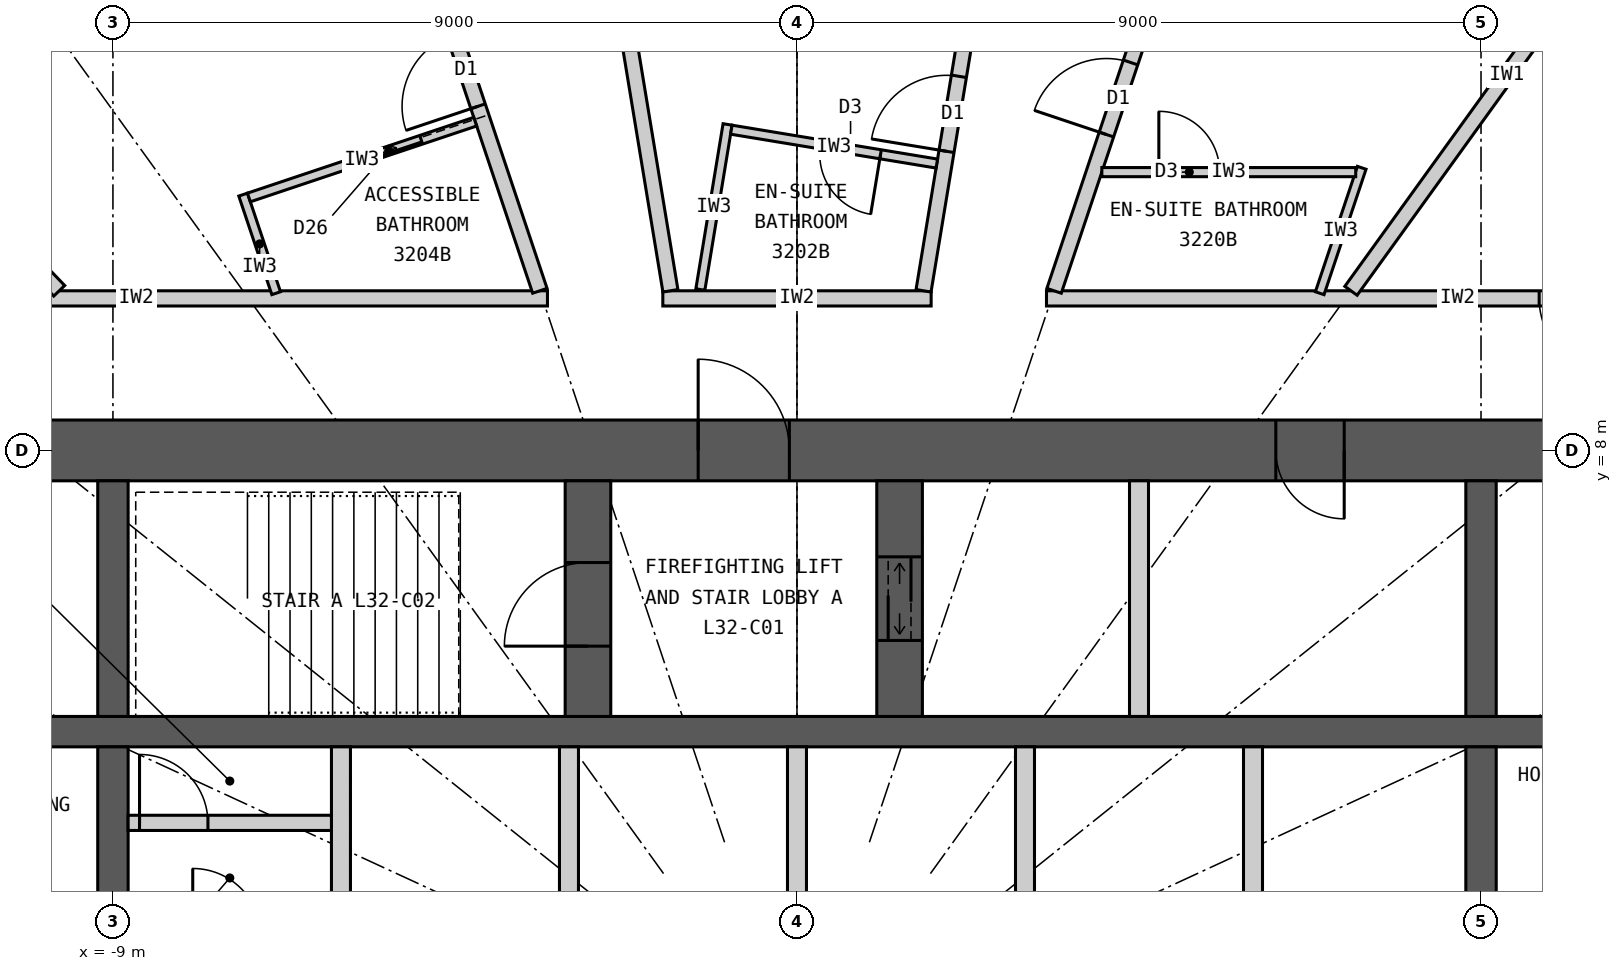
"""IFC4 building model, lengths in metres.
Left out: names, types, materials, properties, quantities, classifications, styles, units other than length and angle.
Written with IfcOpenShell. Run it as: python <this file> out.ifc"""

import sys

from ifc_helpers import new_model, si_unit, direction, frame, frame_2d, origin, place, context, subcontext, project, spatial, rectangle, extrude, element, fill, save


model = new_model("IFC4")
c1 = context("Model", 3, precision=1e-05, world=origin(), true_north=direction((0.0, 1.0)))
c2 = subcontext(c1, "Body", "Model", "MODEL_VIEW")
j1 = project(units=[si_unit("LENGTHUNIT", "METRE"), si_unit("PLANEANGLEUNIT", "RADIAN")], contexts=[c1])
p1 = place(None, origin())
s1 = spatial("IfcSite", under=j1, at=p1, CompositionType="ELEMENT")
p2 = place(p1, origin())
s2 = spatial("IfcBuilding", under=s1, at=p2, CompositionType="ELEMENT")
p3 = place(p2, frame((0.0, 0.0, 125.4)))
s3 = spatial("IfcBuildingStorey", under=s2, at=p3, CompositionType="ELEMENT", Elevation=125.4)
p4 = place(p3, frame((-12.4, 8.0, 0.0), z_axis=(0.0, 0.0, 1.0), x_axis=(1.0, 0.0, 0.0)))
e1 = element("IfcWall", 1, at=p4, inside=s3, PredefinedType="SHEAR", context=c2, shape_type="SweptSolid", body=[
    extrude(rectangle(XDim=24.8, YDim=0.8, at=frame_2d((12.4, 0.0))), origin(), (0.0, 0.0, 1.0), 3.3),
])
p5 = place(p4, frame((11.1, 0.0, 0.0)))
e2 = element("IfcOpeningElement", 2, at=p5, cuts=e1, PredefinedType="OPENING", context=c2, shape_type="SweptSolid", body=[
    extrude(rectangle(XDim=1.2, YDim=2.2, at=frame_2d((0.6, 1.1))), frame((0.0, 0.41, 0.0), z_axis=(0.0, -1.0, 0.0), x_axis=(1.0, 0.0, 0.0)), (0.0, 0.0, 1.0), 0.82),
])
p6 = place(p4, frame((18.7, 0.0, 0.0)))
e3 = element("IfcOpeningElement", 3, at=p6, cuts=e1, PredefinedType="OPENING", context=c2, shape_type="SweptSolid", body=[
    extrude(rectangle(XDim=0.9, YDim=2.2, at=frame_2d((0.45, 1.1))), frame((0.0, 0.41, 0.0), z_axis=(0.0, -1.0, 0.0), x_axis=(1.0, 0.0, 0.0)), (0.0, 0.0, 1.0), 0.82),
])
p7 = place(p3, frame((-11.6, 4.3, 0.0), z_axis=(0.0, 0.0, 1.0), x_axis=(1.0, 0.0, 0.0)))
e4 = element("IfcWall", 4, at=p7, inside=s3, PredefinedType="SHEAR", context=c2, shape_type="SweptSolid", body=[
    extrude(rectangle(XDim=23.2, YDim=0.4, at=frame_2d((11.6, 0.0))), origin(), (0.0, 0.0, 1.0), 3.3),
])
p8 = place(p3, frame((-9.0, 4.5, 0.0), z_axis=(0.0, 0.0, 1.0), x_axis=(0.0, 1.0, 0.0)))
e5 = element("IfcWall", 5, at=p8, inside=s3, PredefinedType="SHEAR", context=c2, shape_type="SweptSolid", body=[
    extrude(rectangle(XDim=3.1, YDim=0.4, at=frame_2d((1.55, 0.0))), origin(), (0.0, 0.0, 1.0), 3.3),
])
p9 = place(p3, frame((-9.0, 1.75, 0.0), z_axis=(0.0, 0.0, 1.0), x_axis=(0.0, 1.0, 0.0)))
e6 = element("IfcWall", 6, at=p9, inside=s3, PredefinedType="SHEAR", context=c2, shape_type="SweptSolid", body=[
    extrude(rectangle(XDim=2.35, YDim=0.4, at=frame_2d((1.175, 0.0))), origin(), (0.0, 0.0, 1.0), 3.3),
])
p10 = place(p3, frame((9.0, 4.5, 0.0), z_axis=(0.0, 0.0, 1.0), x_axis=(0.0, 1.0, 0.0)))
e7 = element("IfcWall", 7, at=p10, inside=s3, PredefinedType="SHEAR", context=c2, shape_type="SweptSolid", body=[
    extrude(rectangle(XDim=3.1, YDim=0.4, at=frame_2d((1.55, 0.0))), origin(), (0.0, 0.0, 1.0), 3.3),
])
p11 = place(p3, frame((9.0, 1.75, 0.0), z_axis=(0.0, 0.0, 1.0), x_axis=(0.0, 1.0, 0.0)))
e8 = element("IfcWall", 8, at=p11, inside=s3, PredefinedType="SHEAR", context=c2, shape_type="SweptSolid", body=[
    extrude(rectangle(XDim=2.35, YDim=0.4, at=frame_2d((1.175, 0.0))), origin(), (0.0, 0.0, 1.0), 3.3),
])
p12 = place(p3, frame((-2.75, 4.5, 0.0), z_axis=(0.0, 0.0, 1.0), x_axis=(0.0, 1.0, 0.0)))
e9 = element("IfcWall", 9, at=p12, inside=s3, PredefinedType="SHEAR", context=c2, shape_type="SweptSolid", body=[
    extrude(rectangle(XDim=3.1, YDim=0.6, at=frame_2d((1.55, 0.0))), origin(), (0.0, 0.0, 1.0), 3.3),
])
p13 = place(p12, frame((0.925, 0.0, 0.0)))
e10 = element("IfcOpeningElement", 10, at=p13, cuts=e9, PredefinedType="OPENING", context=c2, shape_type="SweptSolid", body=[
    extrude(rectangle(XDim=1.1, YDim=2.2, at=frame_2d((0.55, 1.1))), frame((0.0, 0.31, 0.0), z_axis=(0.0, -1.0, 0.0), x_axis=(1.0, 0.0, 0.0)), (0.0, 0.0, 1.0), 0.62),
])
p14 = place(p3, frame((1.35, 4.5, 0.0), z_axis=(0.0, 0.0, 1.0), x_axis=(0.0, 1.0, 0.0)))
e11 = element("IfcWall", 11, at=p14, inside=s3, PredefinedType="SHEAR", context=c2, shape_type="SweptSolid", body=[
    extrude(rectangle(XDim=3.1, YDim=0.6, at=frame_2d((1.55, 0.0))), origin(), (0.0, 0.0, 1.0), 3.3),
])
p15 = place(p14, frame((1.0, 0.0, 0.0)))
e12 = element("IfcOpeningElement", 12, at=p15, cuts=e11, PredefinedType="OPENING", context=c2, shape_type="SweptSolid", body=[
    extrude(rectangle(XDim=1.1, YDim=2.2, at=frame_2d((0.55, 1.1))), frame((0.0, 0.31, 0.0), z_axis=(0.0, -1.0, 0.0), x_axis=(1.0, 0.0, 0.0)), (0.0, 0.0, 1.0), 0.62),
])
p16 = place(p3, frame((4.5, 4.5, 0.0), z_axis=(0.0, 0.0, 1.0), x_axis=(0.0, 1.0, 0.0)))
e13 = element("IfcWall", 13, at=p16, inside=s3, PredefinedType="PARTITIONING", context=c2, shape_type="SweptSolid", body=[
    extrude(rectangle(XDim=3.1, YDim=0.25, at=frame_2d((1.55, 0.0))), origin(), (0.0, 0.0, 1.0), 3.3),
])
for number, where, z_axis, x_axis in (
    (14, (-6.0, 1.75, 0.0), (0.0, 0.0, 1.0), (0.0, 1.0, 0.0)),
    (15, (-3.0, 1.75, 0.0), (0.0, 0.0, 1.0), (0.0, 1.0, 0.0)),
    (16, (0.0, 1.75, 0.0), (0.0, 0.0, 1.0), (0.0, 1.0, 0.0)),
    (17, (3.0, 1.75, 0.0), (0.0, 0.0, 1.0), (0.0, 1.0, 0.0)),
    (18, (6.0, 1.75, 0.0), (0.0, 0.0, 1.0), (0.0, 1.0, 0.0)),
):
    element("IfcWall", number, at=place(p3, frame(where, z_axis=z_axis, x_axis=x_axis)), inside=s3, PredefinedType="PARTITIONING", context=c2, shape_type="SweptSolid", body=[
        extrude(rectangle(XDim=2.35, YDim=0.25, at=frame_2d((1.175, 0.0))), origin(), (0.0, 0.0, 1.0), 3.3),
    ])
p17 = place(p3, frame((-14.1, 10.0, 0.0), z_axis=(0.0, 0.0, 1.0), x_axis=(1.0, 0.0, 0.0)))
e19 = element("IfcWall", 19, at=p17, inside=s3, PredefinedType="PARTITIONING", context=c2, shape_type="SweptSolid", body=[
    extrude(rectangle(XDim=10.817, YDim=0.2, at=frame_2d((5.409, 0.0))), origin(), (0.0, 0.0, 1.0), 3.12),
])
p18 = place(p3, frame((-1.765, 10.0, 0.0), z_axis=(0.0, 0.0, 1.0), x_axis=(1.0, 0.0, 0.0)))
e20 = element("IfcWall", 20, at=p18, inside=s3, PredefinedType="PARTITIONING", context=c2, shape_type="SweptSolid", body=[
    extrude(rectangle(XDim=3.53, YDim=0.2, at=frame_2d((1.765, 0.0))), origin(), (0.0, 0.0, 1.0), 3.12),
])
p19 = place(p3, frame((3.283, 10.0, 0.0), z_axis=(0.0, 0.0, 1.0), x_axis=(1.0, 0.0, 0.0)))
e21 = element("IfcWall", 21, at=p19, inside=s3, PredefinedType="PARTITIONING", context=c2, shape_type="SweptSolid", body=[
    extrude(rectangle(XDim=10.817, YDim=0.2, at=frame_2d((5.409, 0.0))), origin(), (0.0, 0.0, 1.0), 3.12),
])
p20 = place(p19, frame((6.482, 0.0, 0.0)))
e22 = element("IfcOpeningElement", 22, at=p20, cuts=e21, PredefinedType="OPENING", context=c2, shape_type="SweptSolid", body=[
    extrude(rectangle(XDim=1.0, YDim=2.2, at=frame_2d((0.5, 1.1))), frame((0.0, 0.11, 0.0), z_axis=(0.0, -1.0, 0.0), x_axis=(1.0, 0.0, 0.0)), (0.0, 0.0, 1.0), 0.22),
])
p21 = place(p3, frame((7.289, 10.1, 0.0), z_axis=(0.0, 0.0, 1.0), x_axis=(0.585217367024, 0.81087645997, 0.0)))
e23 = element("IfcWall", 23, at=p21, inside=s3, PredefinedType="PARTITIONING", context=c2, shape_type="SweptSolid", body=[
    extrude(rectangle(XDim=7.016, YDim=0.2, at=frame_2d((3.508, 0.0))), origin(), (0.0, 0.0, 1.0), 2.37),
])
p22 = place(p3, frame((3.383, 10.1, 0.0), z_axis=(0.0, 0.0, 1.0), x_axis=(0.317603705574, 0.948223542318, 0.0)))
e24 = element("IfcWall", 24, at=p22, inside=s3, PredefinedType="PARTITIONING", context=c2, shape_type="SweptSolid", body=[
    extrude(rectangle(XDim=7.823, YDim=0.2, at=frame_2d((3.912, 0.0))), origin(), (0.0, 0.0, 1.0), 2.37),
])
p23 = place(p22, frame((2.168, 0.0, 0.0)))
e25 = element("IfcOpeningElement", 25, at=p23, cuts=e24, PredefinedType="OPENING", context=c2, shape_type="SweptSolid", body=[
    extrude(rectangle(XDim=1.0, YDim=2.2, at=frame_2d((0.5, 1.1))), frame((0.0, 0.11, 0.0), z_axis=(0.0, -1.0, 0.0), x_axis=(1.0, 0.0, 0.0)), (0.0, 0.0, 1.0), 0.22),
])
p24 = place(p3, frame((1.665, 10.1, 0.0), z_axis=(0.0, 0.0, 1.0), x_axis=(0.162660519103, 0.986682094459, 0.0)))
e26 = element("IfcWall", 26, at=p24, inside=s3, PredefinedType="PARTITIONING", context=c2, shape_type="SweptSolid", body=[
    extrude(rectangle(XDim=9.111, YDim=0.2, at=frame_2d((4.555, 0.0))), origin(), (0.0, 0.0, 1.0), 3.12),
])
p25 = place(p24, frame((1.86, 0.0, 0.0)))
e27 = element("IfcOpeningElement", 27, at=p25, cuts=e26, PredefinedType="OPENING", context=c2, shape_type="SweptSolid", body=[
    extrude(rectangle(XDim=1.0, YDim=2.2, at=frame_2d((0.5, 1.1))), frame((0.0, 0.11, 0.0), z_axis=(0.0, -1.0, 0.0), x_axis=(1.0, 0.0, 0.0)), (0.0, 0.0, 1.0), 0.22),
])
p26 = place(p3, frame((-1.665, 10.1, 0.0), z_axis=(0.0, 0.0, 1.0), x_axis=(-0.162660519103, 0.986682094459, 0.0)))
e28 = element("IfcWall", 28, at=p26, inside=s3, PredefinedType="PARTITIONING", context=c2, shape_type="SweptSolid", body=[
    extrude(rectangle(XDim=9.111, YDim=0.2, at=frame_2d((4.555, 0.0))), origin(), (0.0, 0.0, 1.0), 3.12),
])
p27 = place(p3, frame((-3.383, 10.1, 0.0), z_axis=(0.0, 0.0, 1.0), x_axis=(-0.317603705574, 0.948223542318, 0.0)))
e29 = element("IfcWall", 29, at=p27, inside=s3, PredefinedType="PARTITIONING", context=c2, shape_type="SweptSolid", body=[
    extrude(rectangle(XDim=7.823, YDim=0.2, at=frame_2d((3.912, 0.0))), origin(), (0.0, 0.0, 1.0), 2.37),
])
p28 = place(p27, frame((2.56, 0.0, 0.0)))
e30 = element("IfcOpeningElement", 30, at=p28, cuts=e29, PredefinedType="OPENING", context=c2, shape_type="SweptSolid", body=[
    extrude(rectangle(XDim=1.0, YDim=2.2, at=frame_2d((0.5, 1.1))), frame((0.0, 0.11, 0.0), z_axis=(0.0, -1.0, 0.0), x_axis=(1.0, 0.0, 0.0)), (0.0, 0.0, 1.0), 0.22),
])
p29 = place(p3, frame((-9.706, 10.1, 0.0), z_axis=(0.0, 0.0, 1.0), x_axis=(-0.692944801824, 0.720990639069, 0.0)))
e31 = element("IfcWall", 31, at=p29, inside=s3, PredefinedType="PARTITIONING", context=c2, shape_type="SweptSolid", body=[
    extrude(rectangle(XDim=7.234, YDim=0.2, at=frame_2d((3.617, 0.0))), origin(), (0.0, 0.0, 1.0), 3.12),
])
p30 = place(p3, frame((-1.271, 10.116, 0.0), z_axis=(0.0, 0.0, 1.0), x_axis=(0.162672481395, 0.986680122328, 0.0)))
e32 = element("IfcWall", 32, at=p30, inside=s3, PredefinedType="PARTITIONING", context=c2, shape_type="SweptSolid", body=[
    extrude(rectangle(XDim=2.202, YDim=0.12, at=frame_2d((1.101, 0.0))), origin(), (0.0, 0.0, 1.0), 3.12),
])
p31 = place(p3, frame((1.84, 11.774, 0.0), z_axis=(0.0, 0.0, 1.0), x_axis=(-0.986676602341, 0.162693830222, 0.0)))
e33 = element("IfcWall", 33, at=p31, inside=s3, PredefinedType="PARTITIONING", context=c2, shape_type="SweptSolid", body=[
    extrude(rectangle(XDim=2.74, YDim=0.12, at=frame_2d((1.37, 0.0))), origin(), (0.0, 0.0, 1.0), 3.12),
])
p32 = place(p31, frame((0.75, 0.0, 0.0)))
e34 = element("IfcOpeningElement", 34, at=p32, cuts=e33, PredefinedType="OPENING", context=c2, shape_type="SweptSolid", body=[
    extrude(rectangle(XDim=0.8, YDim=2.1, at=frame_2d((0.4, 1.05))), frame((0.0, 0.07, 0.0), z_axis=(0.0, -1.0, 0.0), x_axis=(1.0, 0.0, 0.0)), (0.0, 0.0, 1.0), 0.14),
])
p33 = place(p3, frame((-6.852, 10.068, 0.0), z_axis=(0.0, 0.0, 1.0), x_axis=(-0.317619240343, 0.948218338867, 0.0)))
e35 = element("IfcWall", 35, at=p33, inside=s3, PredefinedType="PARTITIONING", context=c2, shape_type="SweptSolid", body=[
    extrude(rectangle(XDim=1.368, YDim=0.12, at=frame_2d((0.684, 0.0))), origin(), (0.0, 0.0, 1.0), 3.12),
])
p34 = place(p3, frame((-4.234, 12.325, 0.0), z_axis=(0.0, 0.0, 1.0), x_axis=(-0.948239154858, -0.317557089663, 0.0)))
e36 = element("IfcWall", 36, at=p34, inside=s3, PredefinedType="PARTITIONING", context=c2, shape_type="SweptSolid", body=[
    extrude(rectangle(XDim=3.14, YDim=0.12, at=frame_2d((1.57, 0.0))), origin(), (0.0, 0.0, 1.0), 3.12),
])
p35 = place(p34, frame((0.75, 0.0, 0.0)))
e37 = element("IfcOpeningElement", 37, at=p35, cuts=e36, PredefinedType="OPENING", context=c2, shape_type="SweptSolid", body=[
    extrude(rectangle(XDim=0.9, YDim=2.1, at=frame_2d((0.45, 1.05))), frame((0.0, 0.07, 0.0), z_axis=(0.0, -1.0, 0.0), x_axis=(1.0, 0.0, 0.0)), (0.0, 0.0, 1.0), 0.14),
])
p36 = place(p3, frame((6.878, 10.068, 0.0), z_axis=(0.0, 0.0, 1.0), x_axis=(0.317532394508, 0.948247424694, 0.0)))
e38 = element("IfcWall", 38, at=p36, inside=s3, PredefinedType="PARTITIONING", context=c2, shape_type="SweptSolid", body=[
    extrude(rectangle(XDim=1.74, YDim=0.12, at=frame_2d((0.87, 0.0))), origin(), (0.0, 0.0, 1.0), 3.12),
])
p37 = place(p3, frame((4.011, 11.661, 0.0), z_axis=(0.0, 0.0, 1.0), x_axis=(1.0, 0.0, 0.0)))
e39 = element("IfcWall", 39, at=p37, inside=s3, PredefinedType="PARTITIONING", context=c2, shape_type="SweptSolid", body=[
    extrude(rectangle(XDim=3.34, YDim=0.12, at=frame_2d((1.67, 0.0))), origin(), (0.0, 0.0, 1.0), 3.12),
])
p38 = place(p37, frame((0.75, 0.0, 0.0)))
e40 = element("IfcOpeningElement", 40, at=p38, cuts=e39, PredefinedType="OPENING", context=c2, shape_type="SweptSolid", body=[
    extrude(rectangle(XDim=0.8, YDim=2.1, at=frame_2d((0.4, 1.05))), frame((0.0, 0.07, 0.0), z_axis=(0.0, -1.0, 0.0), x_axis=(1.0, 0.0, 0.0)), (0.0, 0.0, 1.0), 0.14),
])
p39 = place(p3, frame((-8.8, 3.1, 0.0), z_axis=(0.0, 0.0, 1.0), x_axis=(1.0, 0.0, 0.0)))
e41 = element("IfcWall", 41, at=p39, inside=s3, PredefinedType="PARTITIONING", context=c2, shape_type="SweptSolid", body=[
    extrude(rectangle(XDim=2.675, YDim=0.2, at=frame_2d((1.337, 0.0))), origin(), (0.0, 0.0, 1.0), 3.12),
])
p40 = place(p39, frame((0.15, 0.0, 0.0)))
e42 = element("IfcOpeningElement", 42, at=p40, cuts=e41, PredefinedType="OPENING", context=c2, shape_type="SweptSolid", body=[
    extrude(rectangle(XDim=0.9, YDim=2.2, at=frame_2d((0.45, 1.1))), frame((0.0, 0.11, 0.0), z_axis=(0.0, -1.0, 0.0), x_axis=(1.0, 0.0, 0.0)), (0.0, 0.0, 1.0), 0.22),
])
p41 = place(p32, origin())
e43 = element("IfcDoor", 43, at=p41, inside=s3, OperationType="SINGLE_SWING_LEFT", PredefinedType="DOOR", context=c2, shape_type="SweptSolid", body=[
    extrude(rectangle(XDim=0.8, YDim=2.1, at=frame_2d((0.4, 1.05))), frame((0.0, 0.025, 0.0), z_axis=(0.0, -1.0, 0.0), x_axis=(1.0, 0.0, 0.0)), (0.0, 0.0, 1.0), 0.05),
])
fill(e34, e43)
p42 = place(p25, origin())
e44 = element("IfcDoor", 44, at=p42, inside=s3, OperationType="SINGLE_SWING_LEFT", PredefinedType="DOOR", context=c2, shape_type="SweptSolid", body=[
    extrude(rectangle(XDim=1.0, YDim=2.2, at=frame_2d((0.5, 1.1))), frame((0.0, 0.025, 0.0), z_axis=(0.0, -1.0, 0.0), x_axis=(1.0, 0.0, 0.0)), (0.0, 0.0, 1.0), 0.05),
])
fill(e27, e44)
p43 = place(p35, origin())
e45 = element("IfcDoor", 45, at=p43, inside=s3, OperationType="SLIDING_TO_LEFT", PredefinedType="DOOR", context=c2, shape_type="SweptSolid", body=[
    extrude(rectangle(XDim=0.9, YDim=2.1, at=frame_2d((0.45, 1.05))), frame((0.0, 0.025, 0.0), z_axis=(0.0, -1.0, 0.0), x_axis=(1.0, 0.0, 0.0)), (0.0, 0.0, 1.0), 0.05),
])
fill(e37, e45)
p44 = place(p28, origin())
e46 = element("IfcDoor", 46, at=p44, inside=s3, OperationType="SINGLE_SWING_LEFT", PredefinedType="DOOR", context=c2, shape_type="SweptSolid", body=[
    extrude(rectangle(XDim=1.0, YDim=2.2, at=frame_2d((0.5, 1.1))), frame((0.0, 0.025, 0.0), z_axis=(0.0, -1.0, 0.0), x_axis=(1.0, 0.0, 0.0)), (0.0, 0.0, 1.0), 0.05),
])
fill(e30, e46)
p45 = place(p20, origin())
e47 = element("IfcDoor", 47, at=p45, inside=s3, OperationType="SINGLE_SWING_RIGHT", PredefinedType="DOOR", context=c2, shape_type="SweptSolid", body=[
    extrude(rectangle(XDim=1.0, YDim=2.2, at=frame_2d((0.5, 1.1))), frame((0.0, 0.025, 0.0), z_axis=(0.0, -1.0, 0.0), x_axis=(1.0, 0.0, 0.0)), (0.0, 0.0, 1.0), 0.05),
])
fill(e22, e47)
p46 = place(p38, origin())
e48 = element("IfcDoor", 48, at=p46, inside=s3, OperationType="SINGLE_SWING_LEFT", PredefinedType="DOOR", context=c2, shape_type="SweptSolid", body=[
    extrude(rectangle(XDim=0.8, YDim=2.1, at=frame_2d((0.4, 1.05))), frame((0.0, 0.025, 0.0), z_axis=(0.0, -1.0, 0.0), x_axis=(1.0, 0.0, 0.0)), (0.0, 0.0, 1.0), 0.05),
])
fill(e40, e48)
p47 = place(p23, origin())
e49 = element("IfcDoor", 49, at=p47, inside=s3, OperationType="SINGLE_SWING_LEFT", PredefinedType="DOOR", context=c2, shape_type="SweptSolid", body=[
    extrude(rectangle(XDim=1.0, YDim=2.2, at=frame_2d((0.5, 1.1))), frame((0.0, 0.025, 0.0), z_axis=(0.0, -1.0, 0.0), x_axis=(1.0, 0.0, 0.0)), (0.0, 0.0, 1.0), 0.05),
])
fill(e25, e49)
p48 = place(p5, origin())
e50 = element("IfcDoor", 50, at=p48, inside=s3, OperationType="SINGLE_SWING_LEFT", PredefinedType="DOOR", context=c2, shape_type="SweptSolid", body=[
    extrude(rectangle(XDim=1.2, YDim=2.2, at=frame_2d((0.6, 1.1))), frame((0.0, 0.025, 0.0), z_axis=(0.0, -1.0, 0.0), x_axis=(1.0, 0.0, 0.0)), (0.0, 0.0, 1.0), 0.05),
])
fill(e2, e50)
p49 = place(p13, origin())
e51 = element("IfcDoor", 51, at=p49, inside=s3, OperationType="SINGLE_SWING_LEFT", PredefinedType="DOOR", context=c2, shape_type="SweptSolid", body=[
    extrude(rectangle(XDim=1.1, YDim=2.2, at=frame_2d((0.55, 1.1))), frame((0.0, 0.025, 0.0), z_axis=(0.0, -1.0, 0.0), x_axis=(1.0, 0.0, 0.0)), (0.0, 0.0, 1.0), 0.05),
])
fill(e10, e51)
p50 = place(p15, origin())
e52 = element("IfcDoor", 52, at=p50, inside=s3, OperationType="DOUBLE_DOOR_SLIDING", PredefinedType="DOOR", context=c2, shape_type="SweptSolid", body=[
    extrude(rectangle(XDim=1.1, YDim=2.2, at=frame_2d((0.55, 1.1))), frame((0.0, 0.025, 0.0), z_axis=(0.0, -1.0, 0.0), x_axis=(1.0, 0.0, 0.0)), (0.0, 0.0, 1.0), 0.05),
])
fill(e12, e52)
p51 = place(p6, origin())
e53 = element("IfcDoor", 53, at=p51, inside=s3, OperationType="SINGLE_SWING_RIGHT", PredefinedType="DOOR", context=c2, shape_type="SweptSolid", body=[
    extrude(rectangle(XDim=0.9, YDim=2.2, at=frame_2d((0.45, 1.1))), frame((0.0, 0.025, 0.0), z_axis=(0.0, -1.0, 0.0), x_axis=(1.0, 0.0, 0.0)), (0.0, 0.0, 1.0), 0.05),
])
fill(e3, e53)
p52 = place(p40, origin())
e54 = element("IfcDoor", 54, at=p52, inside=s3, OperationType="SINGLE_SWING_LEFT", PredefinedType="DOOR", context=c2, shape_type="SweptSolid", body=[
    extrude(rectangle(XDim=0.9, YDim=2.2, at=frame_2d((0.45, 1.1))), frame((0.0, 0.025, 0.0), z_axis=(0.0, -1.0, 0.0), x_axis=(1.0, 0.0, 0.0)), (0.0, 0.0, 1.0), 0.05),
])
fill(e42, e54)
save(model, sys.argv[1])
